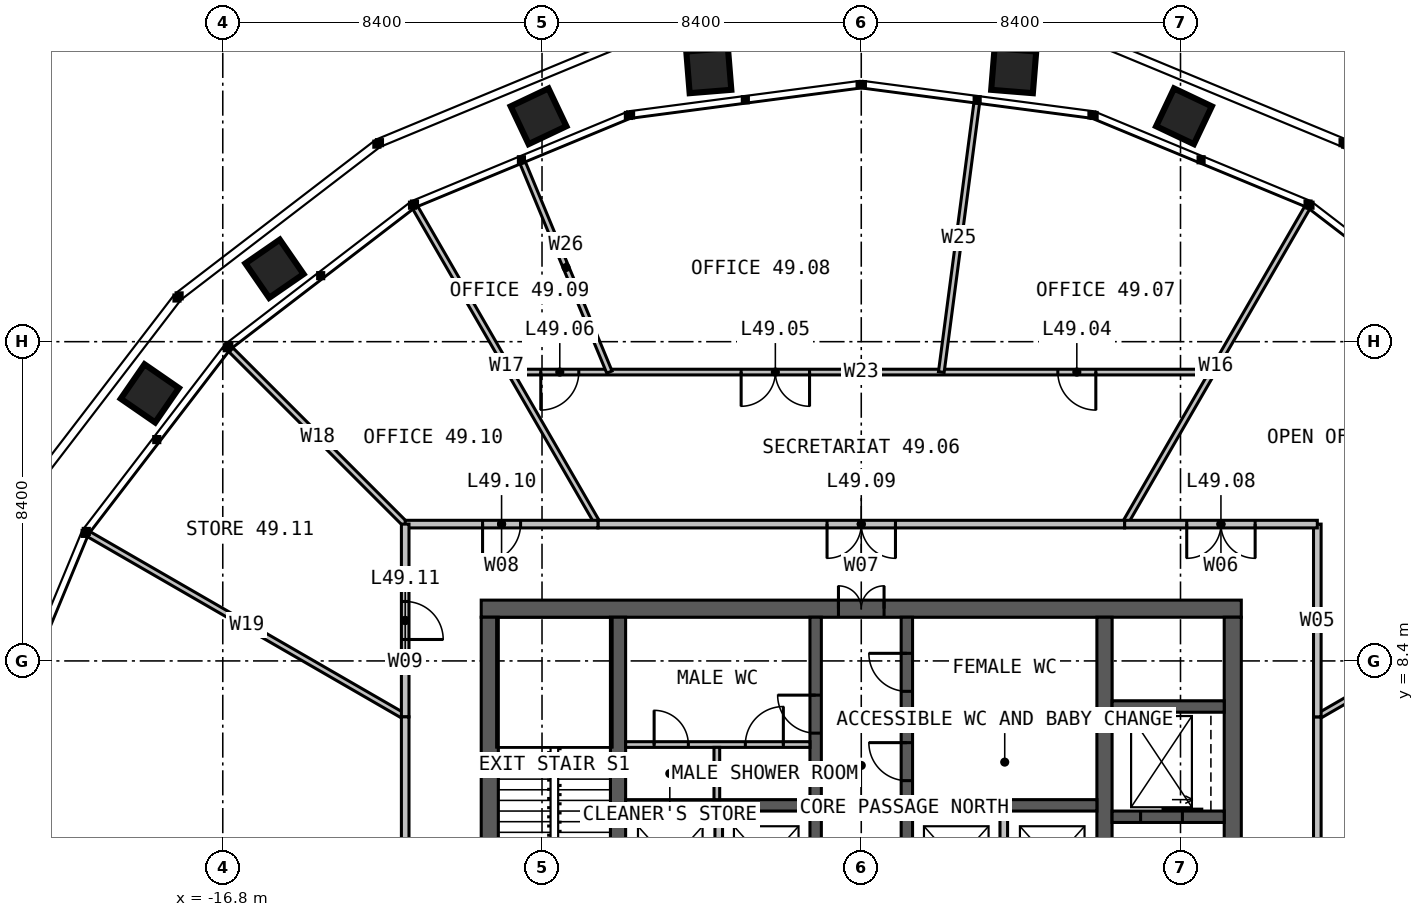
"""IFC4 building model, lengths in metres.
Left out: names, types, materials, properties, quantities, classifications, styles, units other than length and angle.
Written with IfcOpenShell. Run it as: python <this file> out.ifc"""

import sys

from ifc_helpers import new_model, si_unit, direction, frame, frame_2d, origin, place, context, subcontext, project, spatial, rectangle, extrude, element, fill, save


model = new_model("IFC4")
c1 = context("Model", 3, precision=1e-05, world=origin(), true_north=direction((0.0, 1.0)))
c2 = subcontext(c1, "Body", "Model", "MODEL_VIEW")
j1 = project(units=[si_unit("LENGTHUNIT", "METRE"), si_unit("PLANEANGLEUNIT", "RADIAN")], contexts=[c1])
p1 = place(None, origin())
s1 = spatial("IfcSite", under=j1, at=p1, CompositionType="ELEMENT")
p2 = place(p1, origin())
s2 = spatial("IfcBuilding", under=s1, at=p2, CompositionType="ELEMENT")
p3 = place(p2, frame((0.0, 0.0, 203.0)))
s3 = spatial("IfcBuildingStorey", under=s2, at=p3, CompositionType="ELEMENT", Elevation=203.0)
p4 = place(p3, frame((-10.0, 9.775, 0.0), z_axis=(0.0, 0.0, 1.0), x_axis=(1.0, 0.0, 0.0)))
e1 = element("IfcWall", 1, at=p4, inside=s3, PredefinedType="SOLIDWALL", context=c2, shape_type="SweptSolid", body=[
    extrude(rectangle(XDim=20.0, YDim=0.45, at=frame_2d((10.0, 0.0))), origin(), (0.0, 0.0, 1.0), 4.0),
])
p5 = place(p4, frame((9.4, 0.0, 0.0)))
e2 = element("IfcOpeningElement", 2, at=p5, cuts=e1, PredefinedType="OPENING", context=c2, shape_type="SweptSolid", body=[
    extrude(rectangle(XDim=1.2, YDim=2.2, at=frame_2d((0.6, 1.1))), frame((0.0, 0.235, 0.0), z_axis=(0.0, -1.0, 0.0), x_axis=(1.0, 0.0, 0.0)), (0.0, 0.0, 1.0), 0.47),
])
for number, where, z_axis, x_axis in (
    (3, (9.775, -9.55, 0.0), (0.0, 0.0, 1.0), (0.0, 1.0, 0.0)),
    (4, (-9.775, 9.55, 0.0), (0.0, 0.0, 1.0), (0.0, -1.0, 0.0)),
):
    element("IfcWall", number, at=place(p3, frame(where, z_axis=z_axis, x_axis=x_axis)), inside=s3, PredefinedType="SOLIDWALL", context=c2, shape_type="SweptSolid", body=[
        extrude(rectangle(XDim=19.1, YDim=0.45, at=frame_2d((9.55, 0.0))), origin(), (0.0, 0.0, 1.0), 4.0),
    ])
p6 = place(p3, frame((-6.4, -9.55, 0.0), z_axis=(0.0, 0.0, 1.0), x_axis=(0.0, 1.0, 0.0)))
e5 = element("IfcWall", 5, at=p6, inside=s3, PredefinedType="SOLIDWALL", context=c2, shape_type="SweptSolid", body=[
    extrude(rectangle(XDim=19.1, YDim=0.4, at=frame_2d((9.55, 0.0))), origin(), (0.0, 0.0, 1.0), 4.0),
])
p7 = place(p6, frame((9.05, 0.0, 0.0)))
e6 = element("IfcOpeningElement", 6, at=p7, cuts=e5, PredefinedType="OPENING", context=c2, shape_type="SweptSolid", body=[
    extrude(rectangle(XDim=1.0, YDim=2.2, at=frame_2d((0.5, 1.1))), frame((0.0, 0.21, 0.0), z_axis=(0.0, -1.0, 0.0), x_axis=(1.0, 0.0, 0.0)), (0.0, 0.0, 1.0), 0.42),
])
p8 = place(p3, frame((6.4, 9.55, 0.0), z_axis=(0.0, 0.0, 1.0), x_axis=(0.0, -1.0, 0.0)))
e7 = element("IfcWall", 7, at=p8, inside=s3, PredefinedType="SOLIDWALL", context=c2, shape_type="SweptSolid", body=[
    extrude(rectangle(XDim=19.1, YDim=0.4, at=frame_2d((9.55, 0.0))), origin(), (0.0, 0.0, 1.0), 4.0),
])
p9 = place(p8, frame((9.05, 0.0, 0.0)))
e8 = element("IfcOpeningElement", 8, at=p9, cuts=e7, PredefinedType="OPENING", context=c2, shape_type="SweptSolid", body=[
    extrude(rectangle(XDim=1.0, YDim=2.2, at=frame_2d((0.5, 1.1))), frame((0.0, 0.21, 0.0), z_axis=(0.0, -1.0, 0.0), x_axis=(1.0, 0.0, 0.0)), (0.0, 0.0, 1.0), 0.42),
])
for number, where, z_axis, x_axis in (
    (9, (-6.2, 4.6, 0.0), (0.0, 0.0, 1.0), (1.0, 0.0, 0.0)),
    (10, (1.35, 4.6, 0.0), (0.0, 0.0, 1.0), (1.0, 0.0, 0.0)),
):
    element("IfcWall", number, at=place(p3, frame(where, z_axis=z_axis, x_axis=x_axis)), inside=s3, PredefinedType="SOLIDWALL", context=c2, shape_type="SweptSolid", body=[
        extrude(rectangle(XDim=4.85, YDim=0.3, at=frame_2d((2.425, 0.0))), origin(), (0.0, 0.0, 1.0), 4.0),
    ])
p10 = place(p3, frame((-1.2, 1.45, 0.0), z_axis=(0.0, 0.0, 1.0), x_axis=(0.0, 1.0, 0.0)))
e11 = element("IfcWall", 11, at=p10, inside=s3, PredefinedType="SOLIDWALL", context=c2, shape_type="SweptSolid", body=[
    extrude(rectangle(XDim=8.1, YDim=0.3, at=frame_2d((4.05, 0.0))), origin(), (0.0, 0.0, 1.0), 4.0),
])
p11 = place(p10, frame((5.05, 0.0, 0.0)))
e12 = element("IfcOpeningElement", 12, at=p11, cuts=e11, PredefinedType="OPENING", context=c2, shape_type="SweptSolid", body=[
    extrude(rectangle(XDim=1.0, YDim=2.2, at=frame_2d((0.5, 1.1))), frame((0.0, 0.16, 0.0), z_axis=(0.0, -1.0, 0.0), x_axis=(1.0, 0.0, 0.0)), (0.0, 0.0, 1.0), 0.32),
])
p12 = place(p3, frame((1.2, 1.45, 0.0), z_axis=(0.0, 0.0, 1.0), x_axis=(0.0, 1.0, 0.0)))
e13 = element("IfcWall", 13, at=p12, inside=s3, PredefinedType="SOLIDWALL", context=c2, shape_type="SweptSolid", body=[
    extrude(rectangle(XDim=8.1, YDim=0.3, at=frame_2d((4.05, 0.0))), origin(), (0.0, 0.0, 1.0), 4.0),
])
p13 = place(p12, frame((3.8, 0.0, 0.0)))
e14 = element("IfcOpeningElement", 14, at=p13, cuts=e13, PredefinedType="OPENING", context=c2, shape_type="SweptSolid", body=[
    extrude(rectangle(XDim=1.0, YDim=2.2, at=frame_2d((0.5, 1.1))), frame((0.0, 0.16, 0.0), z_axis=(0.0, -1.0, 0.0), x_axis=(1.0, 0.0, 0.0)), (0.0, 0.0, 1.0), 0.32),
])
p14 = place(p12, frame((6.15, 0.0, 0.0)))
e15 = element("IfcOpeningElement", 15, at=p14, cuts=e13, PredefinedType="OPENING", context=c2, shape_type="SweptSolid", body=[
    extrude(rectangle(XDim=1.0, YDim=2.2, at=frame_2d((0.5, 1.1))), frame((0.0, 0.16, 0.0), z_axis=(0.0, -1.0, 0.0), x_axis=(1.0, 0.0, 0.0)), (0.0, 0.0, 1.0), 0.32),
])
p15 = place(p3, frame((6.6, 4.3, 0.0), z_axis=(0.0, 0.0, 1.0), x_axis=(1.0, 0.0, 0.0)))
e16 = element("IfcWall", 16, at=p15, inside=s3, PredefinedType="SOLIDWALL", context=c2, shape_type="SweptSolid", body=[
    extrude(rectangle(XDim=2.95, YDim=0.3, at=frame_2d((1.475, 0.0))), origin(), (0.0, 0.0, 1.0), 4.0),
])
p16 = place(p15, frame((0.75, 0.0, 0.0)))
e17 = element("IfcOpeningElement", 17, at=p16, cuts=e16, PredefinedType="OPENING", context=c2, shape_type="SweptSolid", body=[
    extrude(rectangle(XDim=1.1, YDim=2.2, at=frame_2d((0.55, 1.1))), frame((0.0, 0.16, 0.0), z_axis=(0.0, -1.0, 0.0), x_axis=(1.0, 0.0, 0.0)), (0.0, 0.0, 1.0), 0.32),
])
p17 = place(p3, frame((6.6, 7.2, 0.0), z_axis=(0.0, 0.0, 1.0), x_axis=(1.0, 0.0, 0.0)))
e18 = element("IfcWall", 18, at=p17, inside=s3, PredefinedType="SOLIDWALL", context=c2, shape_type="SweptSolid", body=[
    extrude(rectangle(XDim=2.95, YDim=0.3, at=frame_2d((1.475, 0.0))), origin(), (0.0, 0.0, 1.0), 4.0),
])
for number, where, z_axis, x_axis in (
    (19, (-3.75, 1.75, 0.0), (0.0, 0.0, 1.0), (0.0, 1.0, 0.0)),
    (20, (3.75, 1.75, 0.0), (0.0, 0.0, 1.0), (0.0, 1.0, 0.0)),
):
    element("IfcWall", number, at=place(p3, frame(where, z_axis=z_axis, x_axis=x_axis)), inside=s3, PredefinedType="SOLIDWALL", context=c2, shape_type="SweptSolid", body=[
        extrude(rectangle(XDim=2.7, YDim=0.2, at=frame_2d((1.35, 0.0))), origin(), (0.0, 0.0, 1.0), 3.75),
    ])
p18 = place(p3, frame((1.35, 6.8, 0.0), z_axis=(0.0, 0.0, 1.0), x_axis=(1.0, 0.0, 0.0)))
e21 = element("IfcWall", 21, at=p18, inside=s3, PredefinedType="PARTITIONING", context=c2, shape_type="SweptSolid", body=[
    extrude(rectangle(XDim=4.85, YDim=0.15, at=frame_2d((2.425, 0.0))), origin(), (0.0, 0.0, 1.0), 3.75),
])
p19 = place(p3, frame((-6.2, 6.2, 0.0), z_axis=(0.0, 0.0, 1.0), x_axis=(1.0, 0.0, 0.0)))
e22 = element("IfcWall", 22, at=p19, inside=s3, PredefinedType="PARTITIONING", context=c2, shape_type="SweptSolid", body=[
    extrude(rectangle(XDim=4.85, YDim=0.15, at=frame_2d((2.425, 0.0))), origin(), (0.0, 0.0, 1.0), 3.75),
])
p20 = place(p19, frame((3.15, 0.0, 0.0)))
e23 = element("IfcOpeningElement", 23, at=p20, cuts=e22, PredefinedType="OPENING", context=c2, shape_type="SweptSolid", body=[
    extrude(rectangle(XDim=1.0, YDim=2.2, at=frame_2d((0.5, 1.1))), frame((0.0, 0.085, 0.0), z_axis=(0.0, -1.0, 0.0), x_axis=(1.0, 0.0, 0.0)), (0.0, 0.0, 1.0), 0.17),
])
p21 = place(p19, frame((0.75, 0.0, 0.0)))
e24 = element("IfcOpeningElement", 24, at=p21, cuts=e22, PredefinedType="OPENING", context=c2, shape_type="SweptSolid", body=[
    extrude(rectangle(XDim=0.9, YDim=2.2, at=frame_2d((0.45, 1.1))), frame((0.0, 0.085, 0.0), z_axis=(0.0, -1.0, 0.0), x_axis=(1.0, 0.0, 0.0)), (0.0, 0.0, 1.0), 0.17),
])
p22 = place(p3, frame((-3.8, 4.75, 0.0), z_axis=(0.0, 0.0, 1.0), x_axis=(0.0, 1.0, 0.0)))
e25 = element("IfcWall", 25, at=p22, inside=s3, PredefinedType="PARTITIONING", context=c2, shape_type="SweptSolid", body=[
    extrude(rectangle(XDim=1.375, YDim=0.15, at=frame_2d((0.688, 0.0))), origin(), (0.0, 0.0, 1.0), 3.75),
])
for number, where, z_axis, x_axis in (
    (26, (12.0, 6.928, 0.0), (0.0, 0.0, 1.0), (0.866, 0.5, 0.0)),
    (27, (6.928, 12.0, 0.0), (0.0, 0.0, 1.0), (0.5, 0.866, 0.0)),
    (28, (-6.928, 12.0, 0.0), (0.0, 0.0, 1.0), (-0.5, 0.866, 0.0)),
):
    element("IfcWall", number, at=place(p3, frame(where, z_axis=z_axis, x_axis=x_axis)), inside=s3, PredefinedType="PARTITIONING", context=c2, shape_type="SweptSolid", body=[
        extrude(rectangle(XDim=9.62, YDim=0.15, at=frame_2d((4.81, 0.0))), origin(), (0.0, 0.0, 1.0), 2.79),
    ])
p23 = place(p3, frame((-12.0, 12.0, 0.0), z_axis=(0.0, 0.0, 1.0), x_axis=(-0.707106781187, 0.707106781187, 0.0)))
e29 = element("IfcWall", 29, at=p23, inside=s3, PredefinedType="PARTITIONING", context=c2, shape_type="SweptSolid", body=[
    extrude(rectangle(XDim=6.506, YDim=0.15, at=frame_2d((3.253, 0.0))), origin(), (0.0, 0.0, 1.0), 2.79),
])
p24 = place(p3, frame((-12.0, 6.928, 0.0), z_axis=(0.0, 0.0, 1.0), x_axis=(-0.866030904871, 0.499990471717, 0.0)))
e30 = element("IfcWall", 30, at=p24, inside=s3, PredefinedType="PARTITIONING", context=c2, shape_type="SweptSolid", body=[
    extrude(rectangle(XDim=9.62, YDim=0.15, at=frame_2d((4.81, 0.0))), origin(), (0.0, 0.0, 1.0), 2.79),
])
p25 = place(p3, frame((12.0, -6.928, 0.0), z_axis=(0.0, 0.0, 1.0), x_axis=(0.0, 1.0, 0.0)))
e31 = element("IfcWall", 31, at=p25, inside=s3, PredefinedType="PARTITIONING", context=c2, shape_type="SweptSolid", body=[
    extrude(rectangle(XDim=13.856, YDim=0.2, at=frame_2d((6.928, 0.0))), origin(), (0.0, 0.0, 1.0), 3.8),
])
p26 = place(p25, frame((6.028, 0.0, 0.0)))
e32 = element("IfcOpeningElement", 32, at=p26, cuts=e31, PredefinedType="OPENING", context=c2, shape_type="SweptSolid", body=[
    extrude(rectangle(XDim=1.8, YDim=2.2, at=frame_2d((0.9, 1.1))), frame((0.0, 0.11, 0.0), z_axis=(0.0, -1.0, 0.0), x_axis=(1.0, 0.0, 0.0)), (0.0, 0.0, 1.0), 0.22),
])
p27 = place(p3, frame((12.0, 6.928, 0.0), z_axis=(0.0, 0.0, 1.0), x_axis=(0.0, 1.0, 0.0)))
e33 = element("IfcWall", 33, at=p27, inside=s3, PredefinedType="PARTITIONING", context=c2, shape_type="SweptSolid", body=[
    extrude(rectangle(XDim=5.072, YDim=0.2, at=frame_2d((2.536, 0.0))), origin(), (0.0, 0.0, 1.0), 3.8),
])
p28 = place(p3, frame((12.0, 12.0, 0.0), z_axis=(0.0, 0.0, 1.0), x_axis=(-1.0, 0.0, 0.0)))
e34 = element("IfcWall", 34, at=p28, inside=s3, PredefinedType="PARTITIONING", context=c2, shape_type="SweptSolid", body=[
    extrude(rectangle(XDim=5.072, YDim=0.2, at=frame_2d((2.536, 0.0))), origin(), (0.0, 0.0, 1.0), 3.8),
])
p29 = place(p28, frame((1.636, 0.0, 0.0)))
e35 = element("IfcOpeningElement", 35, at=p29, cuts=e34, PredefinedType="OPENING", context=c2, shape_type="SweptSolid", body=[
    extrude(rectangle(XDim=1.8, YDim=2.2, at=frame_2d((0.9, 1.1))), frame((0.0, 0.11, 0.0), z_axis=(0.0, -1.0, 0.0), x_axis=(1.0, 0.0, 0.0)), (0.0, 0.0, 1.0), 0.22),
])
p30 = place(p3, frame((9.238, 16.0, 0.0), z_axis=(0.0, 0.0, 1.0), x_axis=(-1.0, 0.0, 0.0)))
e36 = element("IfcWall", 36, at=p30, inside=s3, PredefinedType="PARTITIONING", context=c2, shape_type="SweptSolid", body=[
    extrude(rectangle(XDim=18.475, YDim=0.15, at=frame_2d((9.238, 0.0))), origin(), (0.0, 0.0, 1.0), 2.79),
])
p31 = place(p30, frame((3.066, 0.0, 0.0)))
e37 = element("IfcOpeningElement", 37, at=p31, cuts=e36, PredefinedType="OPENING", context=c2, shape_type="SweptSolid", body=[
    extrude(rectangle(XDim=1.0, YDim=2.2, at=frame_2d((0.5, 1.1))), frame((0.0, 0.085, 0.0), z_axis=(0.0, -1.0, 0.0), x_axis=(1.0, 0.0, 0.0)), (0.0, 0.0, 1.0), 0.17),
])
p32 = place(p30, frame((10.598, 0.0, 0.0)))
e38 = element("IfcOpeningElement", 38, at=p32, cuts=e36, PredefinedType="OPENING", context=c2, shape_type="SweptSolid", body=[
    extrude(rectangle(XDim=1.8, YDim=2.2, at=frame_2d((0.9, 1.1))), frame((0.0, 0.085, 0.0), z_axis=(0.0, -1.0, 0.0), x_axis=(1.0, 0.0, 0.0)), (0.0, 0.0, 1.0), 0.17),
])
p33 = place(p30, frame((16.67, 0.0, 0.0)))
e39 = element("IfcOpeningElement", 39, at=p33, cuts=e36, PredefinedType="OPENING", context=c2, shape_type="SweptSolid", body=[
    extrude(rectangle(XDim=1.0, YDim=2.2, at=frame_2d((0.5, 1.1))), frame((0.0, 0.085, 0.0), z_axis=(0.0, -1.0, 0.0), x_axis=(1.0, 0.0, 0.0)), (0.0, 0.0, 1.0), 0.17),
])
p34 = place(p3, frame((2.106, 16.0, 0.0), z_axis=(0.0, 0.0, 1.0), x_axis=(0.130532379334, 0.991444046805, 0.0)))
e40 = element("IfcWall", 40, at=p34, inside=s3, PredefinedType="PARTITIONING", context=c2, shape_type="SweptSolid", body=[
    extrude(rectangle(XDim=7.137, YDim=0.15, at=frame_2d((3.569, 0.0))), origin(), (0.0, 0.0, 1.0), 2.79),
])
p35 = place(p3, frame((-6.627, 16.0, 0.0), z_axis=(0.0, 0.0, 1.0), x_axis=(-0.382661871878, 0.923888462863, 0.0)))
e41 = element("IfcWall", 41, at=p35, inside=s3, PredefinedType="PARTITIONING", context=c2, shape_type="SweptSolid", body=[
    extrude(rectangle(XDim=5.957, YDim=0.15, at=frame_2d((2.979, 0.0))), origin(), (0.0, 0.0, 1.0), 2.79),
])
p36 = place(p3, frame((6.928, 12.0, 0.0), z_axis=(0.0, 0.0, 1.0), x_axis=(-1.0, 0.0, 0.0)))
e42 = element("IfcWall", 42, at=p36, inside=s3, PredefinedType="PARTITIONING", context=c2, shape_type="SweptSolid", body=[
    extrude(rectangle(XDim=13.856, YDim=0.2, at=frame_2d((6.928, 0.0))), origin(), (0.0, 0.0, 1.0), 3.8),
])
p37 = place(p36, frame((6.028, 0.0, 0.0)))
e43 = element("IfcOpeningElement", 43, at=p37, cuts=e42, PredefinedType="OPENING", context=c2, shape_type="SweptSolid", body=[
    extrude(rectangle(XDim=1.8, YDim=2.2, at=frame_2d((0.9, 1.1))), frame((0.0, 0.11, 0.0), z_axis=(0.0, -1.0, 0.0), x_axis=(1.0, 0.0, 0.0)), (0.0, 0.0, 1.0), 0.22),
])
p38 = place(p3, frame((-6.928, 12.0, 0.0), z_axis=(0.0, 0.0, 1.0), x_axis=(-1.0, 0.0, 0.0)))
e44 = element("IfcWall", 44, at=p38, inside=s3, PredefinedType="PARTITIONING", context=c2, shape_type="SweptSolid", body=[
    extrude(rectangle(XDim=5.072, YDim=0.2, at=frame_2d((2.536, 0.0))), origin(), (0.0, 0.0, 1.0), 3.8),
])
p39 = place(p38, frame((2.036, 0.0, 0.0)))
e45 = element("IfcOpeningElement", 45, at=p39, cuts=e44, PredefinedType="OPENING", context=c2, shape_type="SweptSolid", body=[
    extrude(rectangle(XDim=1.0, YDim=2.2, at=frame_2d((0.5, 1.1))), frame((0.0, 0.11, 0.0), z_axis=(0.0, -1.0, 0.0), x_axis=(1.0, 0.0, 0.0)), (0.0, 0.0, 1.0), 0.22),
])
p40 = place(p3, frame((-12.0, 12.0, 0.0), z_axis=(0.0, 0.0, 1.0), x_axis=(0.0, -1.0, 0.0)))
e46 = element("IfcWall", 46, at=p40, inside=s3, PredefinedType="PARTITIONING", context=c2, shape_type="SweptSolid", body=[
    extrude(rectangle(XDim=5.072, YDim=0.2, at=frame_2d((2.536, 0.0))), origin(), (0.0, 0.0, 1.0), 3.8),
])
p41 = place(p40, frame((2.036, 0.0, 0.0)))
e47 = element("IfcOpeningElement", 47, at=p41, cuts=e46, PredefinedType="OPENING", context=c2, shape_type="SweptSolid", body=[
    extrude(rectangle(XDim=1.0, YDim=2.2, at=frame_2d((0.5, 1.1))), frame((0.0, 0.11, 0.0), z_axis=(0.0, -1.0, 0.0), x_axis=(1.0, 0.0, 0.0)), (0.0, 0.0, 1.0), 0.22),
])
p42 = place(p3, frame((-12.0, 6.928, 0.0), z_axis=(0.0, 0.0, 1.0), x_axis=(0.0, -1.0, 0.0)))
e48 = element("IfcWall", 48, at=p42, inside=s3, PredefinedType="PARTITIONING", context=c2, shape_type="SweptSolid", body=[
    extrude(rectangle(XDim=13.856, YDim=0.2, at=frame_2d((6.928, 0.0))), origin(), (0.0, 0.0, 1.0), 3.8),
])
p43 = place(p42, frame((6.028, 0.0, 0.0)))
e49 = element("IfcOpeningElement", 49, at=p43, cuts=e48, PredefinedType="OPENING", context=c2, shape_type="SweptSolid", body=[
    extrude(rectangle(XDim=1.8, YDim=2.2, at=frame_2d((0.9, 1.1))), frame((0.0, 0.11, 0.0), z_axis=(0.0, -1.0, 0.0), x_axis=(1.0, 0.0, 0.0)), (0.0, 0.0, 1.0), 0.22),
])
p44 = place(p5, origin())
e50 = element("IfcDoor", 50, at=p44, inside=s3, OperationType="DOUBLE_DOOR_SINGLE_SWING", PredefinedType="DOOR", context=c2, shape_type="SweptSolid", body=[
    extrude(rectangle(XDim=1.2, YDim=2.2, at=frame_2d((0.6, 1.1))), frame((0.0, 0.025, 0.0), z_axis=(0.0, -1.0, 0.0), x_axis=(1.0, 0.0, 0.0)), (0.0, 0.0, 1.0), 0.05),
])
fill(e2, e50)
p45 = place(p11, origin())
e51 = element("IfcDoor", 51, at=p45, inside=s3, OperationType="SINGLE_SWING_RIGHT", PredefinedType="DOOR", context=c2, shape_type="SweptSolid", body=[
    extrude(rectangle(XDim=1.0, YDim=2.2, at=frame_2d((0.5, 1.1))), frame((0.0, 0.025, 0.0), z_axis=(0.0, -1.0, 0.0), x_axis=(1.0, 0.0, 0.0)), (0.0, 0.0, 1.0), 0.05),
])
fill(e12, e51)
p46 = place(p13, origin())
e52 = element("IfcDoor", 52, at=p46, inside=s3, OperationType="SINGLE_SWING_RIGHT", PredefinedType="DOOR", context=c2, shape_type="SweptSolid", body=[
    extrude(rectangle(XDim=1.0, YDim=2.2, at=frame_2d((0.5, 1.1))), frame((0.0, 0.025, 0.0), z_axis=(0.0, -1.0, 0.0), x_axis=(1.0, 0.0, 0.0)), (0.0, 0.0, 1.0), 0.05),
])
fill(e14, e52)
p47 = place(p14, origin())
e53 = element("IfcDoor", 53, at=p47, inside=s3, OperationType="SINGLE_SWING_RIGHT", PredefinedType="DOOR", context=c2, shape_type="SweptSolid", body=[
    extrude(rectangle(XDim=1.0, YDim=2.2, at=frame_2d((0.5, 1.1))), frame((0.0, 0.025, 0.0), z_axis=(0.0, -1.0, 0.0), x_axis=(1.0, 0.0, 0.0)), (0.0, 0.0, 1.0), 0.05),
])
fill(e15, e53)
p48 = place(p20, origin())
e54 = element("IfcDoor", 54, at=p48, inside=s3, OperationType="SINGLE_SWING_RIGHT", PredefinedType="DOOR", context=c2, shape_type="SweptSolid", body=[
    extrude(rectangle(XDim=1.0, YDim=2.2, at=frame_2d((0.5, 1.1))), frame((0.0, 0.025, 0.0), z_axis=(0.0, -1.0, 0.0), x_axis=(1.0, 0.0, 0.0)), (0.0, 0.0, 1.0), 0.05),
])
fill(e23, e54)
p49 = place(p21, origin())
e55 = element("IfcDoor", 55, at=p49, inside=s3, OperationType="SINGLE_SWING_LEFT", PredefinedType="DOOR", context=c2, shape_type="SweptSolid", body=[
    extrude(rectangle(XDim=0.9, YDim=2.2, at=frame_2d((0.45, 1.1))), frame((0.0, 0.025, 0.0), z_axis=(0.0, -1.0, 0.0), x_axis=(1.0, 0.0, 0.0)), (0.0, 0.0, 1.0), 0.05),
])
fill(e24, e55)
p50 = place(p16, origin())
e56 = element("IfcDoor", 56, at=p50, inside=s3, OperationType="SLIDING_TO_LEFT", PredefinedType="DOOR", context=c2, shape_type="SweptSolid", body=[
    extrude(rectangle(XDim=1.1, YDim=2.2, at=frame_2d((0.55, 1.1))), frame((0.0, 0.025, 0.0), z_axis=(0.0, -1.0, 0.0), x_axis=(1.0, 0.0, 0.0)), (0.0, 0.0, 1.0), 0.05),
])
fill(e17, e56)
p51 = place(p29, origin())
e57 = element("IfcDoor", 57, at=p51, inside=s3, OperationType="DOUBLE_DOOR_SINGLE_SWING", PredefinedType="DOOR", context=c2, shape_type="SweptSolid", body=[
    extrude(rectangle(XDim=1.8, YDim=2.2, at=frame_2d((0.9, 1.1))), frame((0.0, 0.025, 0.0), z_axis=(0.0, -1.0, 0.0), x_axis=(1.0, 0.0, 0.0)), (0.0, 0.0, 1.0), 0.05),
])
fill(e35, e57)
p52 = place(p31, origin())
e58 = element("IfcDoor", 58, at=p52, inside=s3, OperationType="SINGLE_SWING_LEFT", PredefinedType="DOOR", context=c2, shape_type="SweptSolid", body=[
    extrude(rectangle(XDim=1.0, YDim=2.2, at=frame_2d((0.5, 1.1))), frame((0.0, 0.025, 0.0), z_axis=(0.0, -1.0, 0.0), x_axis=(1.0, 0.0, 0.0)), (0.0, 0.0, 1.0), 0.05),
])
fill(e37, e58)
p53 = place(p32, origin())
e59 = element("IfcDoor", 59, at=p53, inside=s3, OperationType="DOUBLE_DOOR_SINGLE_SWING", PredefinedType="DOOR", context=c2, shape_type="SweptSolid", body=[
    extrude(rectangle(XDim=1.8, YDim=2.2, at=frame_2d((0.9, 1.1))), frame((0.0, 0.025, 0.0), z_axis=(0.0, -1.0, 0.0), x_axis=(1.0, 0.0, 0.0)), (0.0, 0.0, 1.0), 0.05),
])
fill(e38, e59)
p54 = place(p33, origin())
e60 = element("IfcDoor", 60, at=p54, inside=s3, OperationType="SINGLE_SWING_RIGHT", PredefinedType="DOOR", context=c2, shape_type="SweptSolid", body=[
    extrude(rectangle(XDim=1.0, YDim=2.2, at=frame_2d((0.5, 1.1))), frame((0.0, 0.025, 0.0), z_axis=(0.0, -1.0, 0.0), x_axis=(1.0, 0.0, 0.0)), (0.0, 0.0, 1.0), 0.05),
])
fill(e39, e60)
p55 = place(p37, origin())
e61 = element("IfcDoor", 61, at=p55, inside=s3, OperationType="DOUBLE_DOOR_SINGLE_SWING", PredefinedType="DOOR", context=c2, shape_type="SweptSolid", body=[
    extrude(rectangle(XDim=1.8, YDim=2.2, at=frame_2d((0.9, 1.1))), frame((0.0, 0.025, 0.0), z_axis=(0.0, -1.0, 0.0), x_axis=(1.0, 0.0, 0.0)), (0.0, 0.0, 1.0), 0.05),
])
fill(e43, e61)
p56 = place(p39, origin())
e62 = element("IfcDoor", 62, at=p56, inside=s3, OperationType="SINGLE_SWING_RIGHT", PredefinedType="DOOR", context=c2, shape_type="SweptSolid", body=[
    extrude(rectangle(XDim=1.0, YDim=2.2, at=frame_2d((0.5, 1.1))), frame((0.0, 0.025, 0.0), z_axis=(0.0, -1.0, 0.0), x_axis=(1.0, 0.0, 0.0)), (0.0, 0.0, 1.0), 0.05),
])
fill(e45, e62)
p57 = place(p41, origin())
e63 = element("IfcDoor", 63, at=p57, inside=s3, OperationType="SINGLE_SWING_RIGHT", PredefinedType="DOOR", context=c2, shape_type="SweptSolid", body=[
    extrude(rectangle(XDim=1.0, YDim=2.2, at=frame_2d((0.5, 1.1))), frame((0.0, 0.025, 0.0), z_axis=(0.0, -1.0, 0.0), x_axis=(1.0, 0.0, 0.0)), (0.0, 0.0, 1.0), 0.05),
])
fill(e47, e63)
save(model, sys.argv[1])
